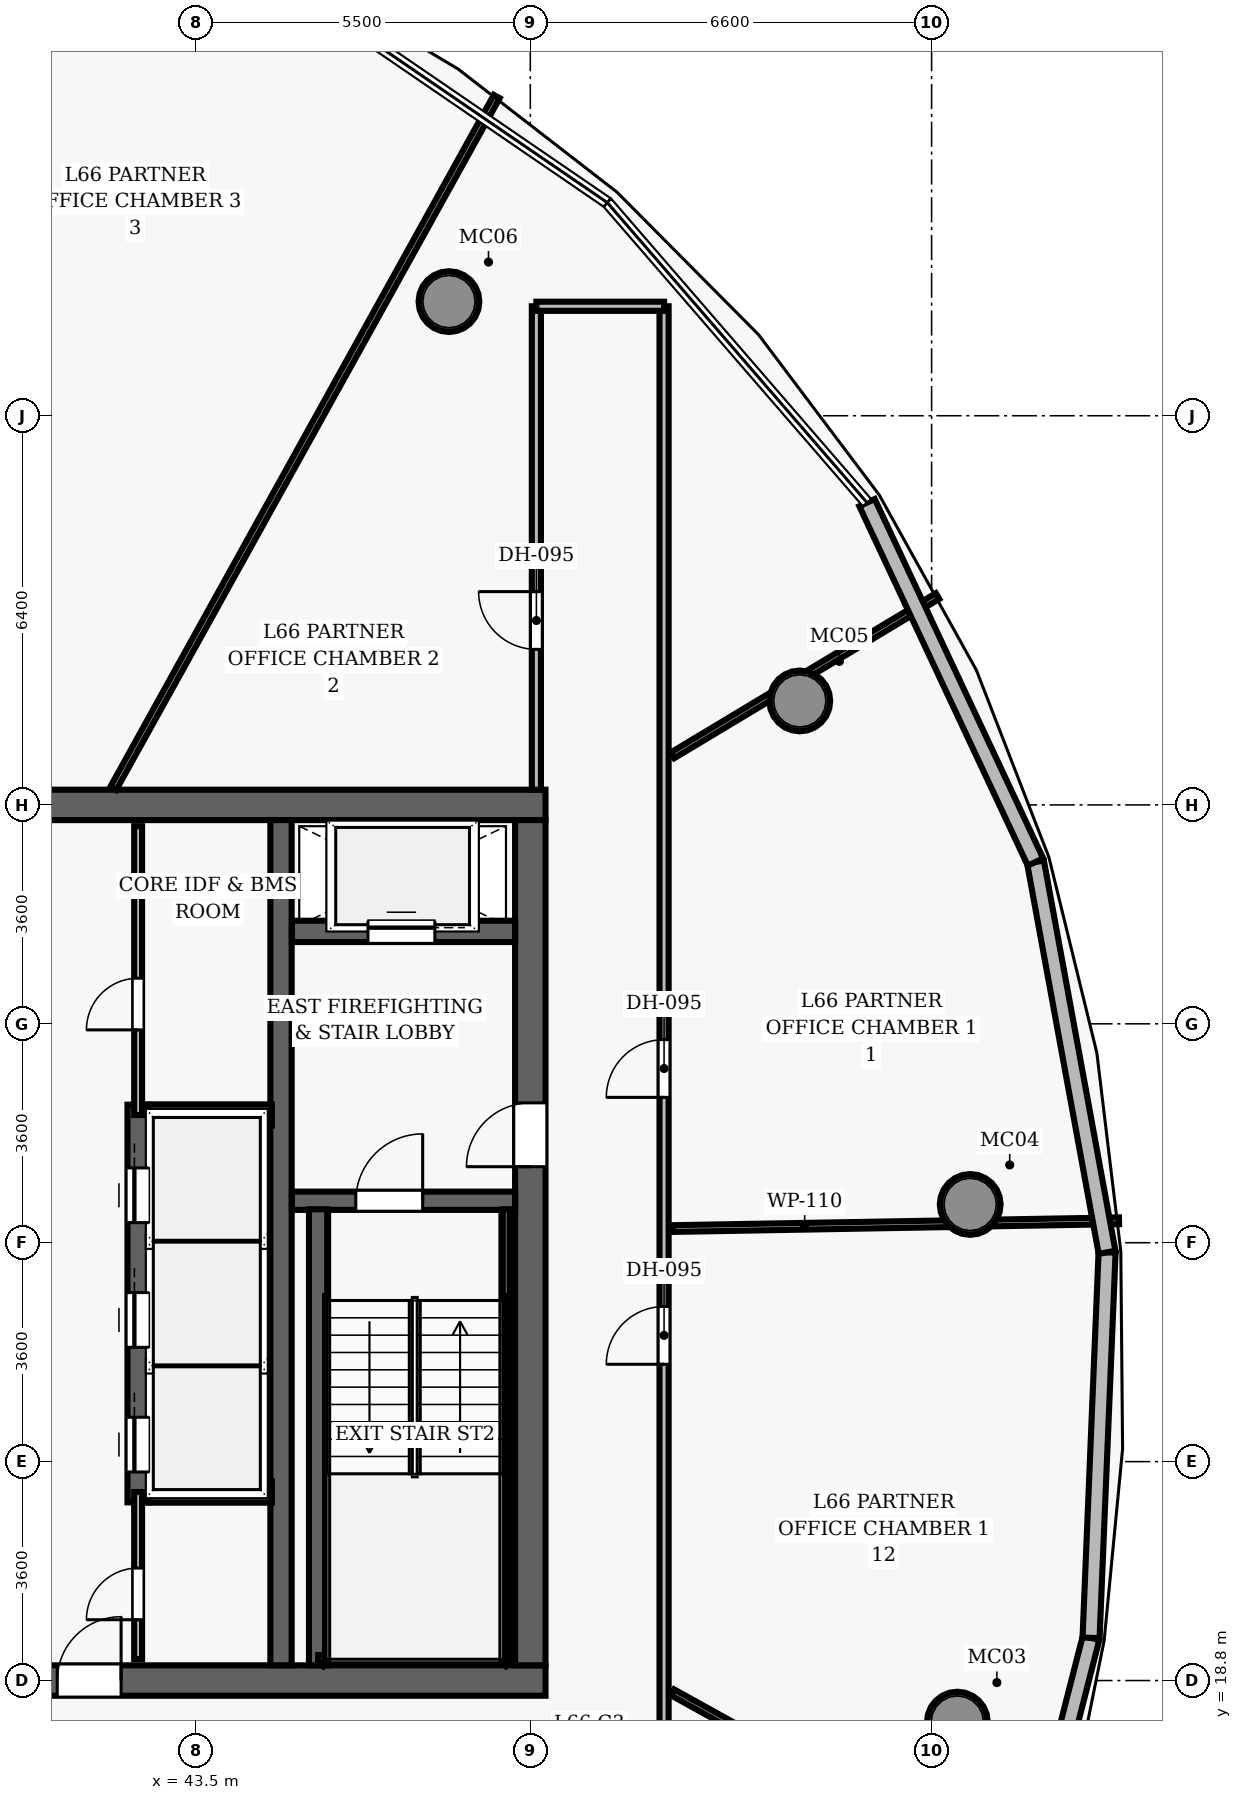
"""IFC4 building model, lengths in metres.
Left out: names, types, materials, properties, quantities, classifications, styles, units other than length and angle.
Written with IfcOpenShell. Run it as: python <this file> out.ifc"""

import sys

from ifc_helpers import new_model, si_unit, direction, frame, frame_2d, origin, origin_2d, place, context, subcontext, project, spatial, rectangle, hollow_circle, extrude, element, fill, save


model = new_model("IFC4")
c1 = context("Model", 3, precision=1e-05, world=origin(), true_north=direction((0.0, 1.0)))
c2 = subcontext(c1, "Body", "Model", "MODEL_VIEW")
j1 = project(units=[si_unit("LENGTHUNIT", "METRE"), si_unit("PLANEANGLEUNIT", "RADIAN")], contexts=[c1])
p1 = place(None, origin())
s1 = spatial("IfcSite", under=j1, at=p1, CompositionType="ELEMENT")
p2 = place(p1, origin())
s2 = spatial("IfcBuilding", under=s1, at=p2, CompositionType="ELEMENT")
p3 = place(p2, frame((0.0, 0.0, 261.3)))
s3 = spatial("IfcBuildingStorey", under=s2, at=p3, CompositionType="ELEMENT", Elevation=261.3)
p4 = place(p3, frame((26.75, 18.8, 0.0), z_axis=(0.0, 0.0, 1.0), x_axis=(1.0, 0.0, 0.0)))
e1 = element("IfcWall", 1, at=p4, inside=s3, PredefinedType="SHEAR", context=c2, shape_type="SweptSolid", body=[
    extrude(rectangle(XDim=22.5, YDim=0.5, at=frame_2d((11.25, 0.0))), origin(), (0.0, 0.0, 1.0), 3.85),
])
p5 = place(p4, frame((14.47, 0.0, 0.0)))
e2 = element("IfcOpeningElement", 2, at=p5, cuts=e1, PredefinedType="OPENING", context=c2, shape_type="SweptSolid", body=[
    extrude(rectangle(XDim=1.05, YDim=2.15, at=frame_2d((0.525, 1.075))), frame((0.0, 0.26, 0.0), z_axis=(0.0, -1.0, 0.0), x_axis=(1.0, 0.0, 0.0)), (0.0, 0.0, 1.0), 0.52),
])
p6 = place(p3, frame((26.75, 33.2, 0.0), z_axis=(0.0, 0.0, 1.0), x_axis=(1.0, 0.0, 0.0)))
e3 = element("IfcWall", 3, at=p6, inside=s3, PredefinedType="SHEAR", context=c2, shape_type="SweptSolid", body=[
    extrude(rectangle(XDim=22.5, YDim=0.5, at=frame_2d((11.25, 0.0))), origin(), (0.0, 0.0, 1.0), 3.85),
])
p7 = place(p3, frame((49.0, 19.05, 0.0), z_axis=(0.0, 0.0, 1.0), x_axis=(0.0, 1.0, 0.0)))
e4 = element("IfcWall", 4, at=p7, inside=s3, PredefinedType="SHEAR", context=c2, shape_type="SweptSolid", body=[
    extrude(rectangle(XDim=13.9, YDim=0.5, at=frame_2d((6.95, 0.0))), origin(), (0.0, 0.0, 1.0), 3.85),
])
p8 = place(p7, frame((8.2, 0.0, 0.0)))
e5 = element("IfcOpeningElement", 5, at=p8, cuts=e4, PredefinedType="OPENING", context=c2, shape_type="SweptSolid", body=[
    extrude(rectangle(XDim=1.05, YDim=2.15, at=frame_2d((0.525, 1.075))), frame((0.0, 0.26, 0.0), z_axis=(0.0, -1.0, 0.0), x_axis=(1.0, 0.0, 0.0)), (0.0, 0.0, 1.0), 0.52),
])
p9 = place(p3, frame((44.9, 19.05, 0.0), z_axis=(0.0, 0.0, 1.0), x_axis=(0.0, 1.0, 0.0)))
e6 = element("IfcWall", 6, at=p9, inside=s3, PredefinedType="SHEAR", context=c2, shape_type="SweptSolid", body=[
    extrude(rectangle(XDim=13.9, YDim=0.35, at=frame_2d((6.95, 0.0))), origin(), (0.0, 0.0, 1.0), 3.85),
])
for number, where, z_axis, x_axis in (
    (7, (56.024, 18.116, 0.0), (0.0, 0.0, 1.0), (1.0, 0.0, 0.0)),
    (8, (56.235, 26.629, 0.0), (0.0, 0.0, 1.0), (1.0, 0.0, 0.0)),
    (9, (53.433, 34.91, 0.0), (0.0, 0.0, 1.0), (1.0, 0.0, 0.0)),
    (10, (47.662, 41.477, 0.0), (0.0, 0.0, 1.0), (1.0, 0.0, 0.0)),
):
    element("IfcColumn", number, at=place(p3, frame(where, z_axis=z_axis, x_axis=x_axis)), inside=s3, PredefinedType="COLUMN", context=c2, shape_type="SweptSolid", body=[
        extrude(hollow_circle(Radius=0.5, WallThickness=0.045, at=origin_2d()), origin(), (0.0, 0.0, 1.0), 3.85),
    ])
p10 = place(p3, frame((45.08, 26.69, 0.0), z_axis=(0.0, 0.0, 1.0), x_axis=(1.0, 0.0, 0.0)))
e11 = element("IfcWall", 11, at=p10, inside=s3, PredefinedType="SHEAR", context=c2, shape_type="SweptSolid", body=[
    extrude(rectangle(XDim=3.67, YDim=0.3, at=frame_2d((1.835, 0.0))), origin(), (0.0, 0.0, 1.0), 3.85),
])
p11 = place(p10, frame((1.05, 0.0, 0.0)))
e12 = element("IfcOpeningElement", 12, at=p11, cuts=e11, PredefinedType="OPENING", context=c2, shape_type="SweptSolid", body=[
    extrude(rectangle(XDim=1.1, YDim=2.15, at=frame_2d((0.55, 1.075))), frame((0.0, 0.16, 0.0), z_axis=(0.0, -1.0, 0.0), x_axis=(1.0, 0.0, 0.0)), (0.0, 0.0, 1.0), 0.32),
])
p12 = place(p3, frame((45.51, 19.05, 0.0), z_axis=(0.0, 0.0, 1.0), x_axis=(0.0, 1.0, 0.0)))
e13 = element("IfcWall", 13, at=p12, inside=s3, PredefinedType="SHEAR", context=c2, shape_type="SweptSolid", body=[
    extrude(rectangle(XDim=7.5, YDim=0.3, at=frame_2d((3.75, 0.0))), origin(), (0.0, 0.0, 1.0), 3.85),
])
p13 = place(p3, frame((48.605, 19.1, 0.0), z_axis=(0.0, 0.0, 1.0), x_axis=(0.0, 1.0, 0.0)))
e14 = element("IfcWall", 14, at=p13, inside=s3, PredefinedType="SHEAR", context=c2, shape_type="SweptSolid", body=[
    extrude(rectangle(XDim=7.45, YDim=0.12, at=frame_2d((3.725, 0.0))), origin(), (0.0, 0.0, 1.0), 3.85),
])
p14 = place(p3, frame((45.51, 19.16, 0.0), z_axis=(0.0, 0.0, 1.0), x_axis=(1.0, 0.0, 0.0)))
e15 = element("IfcWall", 15, at=p14, inside=s3, PredefinedType="SHEAR", context=c2, shape_type="SweptSolid", body=[
    extrude(rectangle(XDim=3.095, YDim=0.12, at=frame_2d((1.547, 0.0))), origin(), (0.0, 0.0, 1.0), 3.85),
])
p15 = place(p3, frame((45.08, 31.12, 0.0), z_axis=(0.0, 0.0, 1.0), x_axis=(1.0, 0.0, 0.0)))
e16 = element("IfcWall", 16, at=p15, inside=s3, PredefinedType="SHEAR", context=c2, shape_type="SweptSolid", body=[
    extrude(rectangle(XDim=3.67, YDim=0.35, at=frame_2d((1.835, 0.0))), origin(), (0.0, 0.0, 1.0), 3.04),
])
p16 = place(p15, frame((1.25, 0.0, 0.0)))
e17 = element("IfcOpeningElement", 17, at=p16, cuts=e16, PredefinedType="OPENING", context=c2, shape_type="SweptSolid", body=[
    extrude(rectangle(XDim=1.1, YDim=2.15, at=frame_2d((0.55, 1.075))), frame((0.0, 0.185, 0.0), z_axis=(0.0, -1.0, 0.0), x_axis=(1.0, 0.0, 0.0)), (0.0, 0.0, 1.0), 0.37),
])
p17 = place(p3, frame((42.55, 21.73, 0.0), z_axis=(0.0, 0.0, 1.0), x_axis=(0.0, 1.0, 0.0)))
e18 = element("IfcWall", 18, at=p17, inside=s3, PredefinedType="SHEAR", context=c2, shape_type="SweptSolid", body=[
    extrude(rectangle(XDim=6.54, YDim=0.35, at=frame_2d((3.27, 0.0))), origin(), (0.0, 0.0, 1.0), 3.04),
])
p18 = place(p17, frame((0.5, 0.0, 0.0)))
e19 = element("IfcOpeningElement", 19, at=p18, cuts=e18, PredefinedType="OPENING", context=c2, shape_type="SweptSolid", body=[
    extrude(rectangle(XDim=0.9, YDim=2.15, at=frame_2d((0.45, 1.075))), frame((0.0, 0.185, 0.0), z_axis=(0.0, -1.0, 0.0), x_axis=(1.0, 0.0, 0.0)), (0.0, 0.0, 1.0), 0.37),
])
p19 = place(p17, frame((2.55, 0.0, 0.0)))
e20 = element("IfcOpeningElement", 20, at=p19, cuts=e18, PredefinedType="OPENING", context=c2, shape_type="SweptSolid", body=[
    extrude(rectangle(XDim=0.9, YDim=2.15, at=frame_2d((0.45, 1.075))), frame((0.0, 0.185, 0.0), z_axis=(0.0, -1.0, 0.0), x_axis=(1.0, 0.0, 0.0)), (0.0, 0.0, 1.0), 0.37),
])
p20 = place(p17, frame((4.6, 0.0, 0.0)))
e21 = element("IfcOpeningElement", 21, at=p20, cuts=e18, PredefinedType="OPENING", context=c2, shape_type="SweptSolid", body=[
    extrude(rectangle(XDim=0.9, YDim=2.15, at=frame_2d((0.45, 1.075))), frame((0.0, 0.185, 0.0), z_axis=(0.0, -1.0, 0.0), x_axis=(1.0, 0.0, 0.0)), (0.0, 0.0, 1.0), 0.37),
])
for number, where, z_axis, x_axis in (
    (22, (42.72, 21.9, 0.0), (0.0, 0.0, 1.0), (1.0, 0.0, 0.0)),
    (23, (42.72, 28.1, 0.0), (0.0, 0.0, 1.0), (1.0, 0.0, 0.0)),
):
    element("IfcWall", number, at=place(p3, frame(where, z_axis=z_axis, x_axis=x_axis)), inside=s3, PredefinedType="SHEAR", context=c2, shape_type="SweptSolid", body=[
        extrude(rectangle(XDim=2.03, YDim=0.35, at=frame_2d((1.015, 0.0))), origin(), (0.0, 0.0, 1.0), 3.04),
    ])
p21 = place(p3, frame((42.55, 28.1, 0.0), z_axis=(0.0, 0.0, 1.0), x_axis=(0.0, 1.0, 0.0)))
e24 = element("IfcWall", 24, at=p21, inside=s3, PredefinedType="PARTITIONING", context=c2, shape_type="SweptSolid", body=[
    extrude(rectangle(XDim=4.75, YDim=0.13, at=frame_2d((2.375, 0.0))), origin(), (0.0, 0.0, 1.0), 3.04),
])
p22 = place(p21, frame((1.4, 0.0, 0.0)))
e25 = element("IfcOpeningElement", 25, at=p22, cuts=e24, PredefinedType="OPENING", context=c2, shape_type="SweptSolid", body=[
    extrude(rectangle(XDim=0.85, YDim=2.1, at=frame_2d((0.425, 1.05))), frame((0.0, 0.075, 0.0), z_axis=(0.0, -1.0, 0.0), x_axis=(1.0, 0.0, 0.0)), (0.0, 0.0, 1.0), 0.15),
])
p23 = place(p3, frame((42.55, 19.15, 0.0), z_axis=(0.0, 0.0, 1.0), x_axis=(0.0, 1.0, 0.0)))
e26 = element("IfcWall", 26, at=p23, inside=s3, PredefinedType="PARTITIONING", context=c2, shape_type="SweptSolid", body=[
    extrude(rectangle(XDim=2.75, YDim=0.13, at=frame_2d((1.375, 0.0))), origin(), (0.0, 0.0, 1.0), 3.04),
])
p24 = place(p23, frame((0.65, 0.0, 0.0)))
e27 = element("IfcOpeningElement", 27, at=p24, cuts=e26, PredefinedType="OPENING", context=c2, shape_type="SweptSolid", body=[
    extrude(rectangle(XDim=0.85, YDim=2.1, at=frame_2d((0.425, 1.05))), frame((0.0, 0.075, 0.0), z_axis=(0.0, -1.0, 0.0), x_axis=(1.0, 0.0, 0.0)), (0.0, 0.0, 1.0), 0.15),
])
p25 = place(p3, frame((51.2, 10.6, 0.0), z_axis=(0.0, 0.0, 1.0), x_axis=(0.0, 1.0, 0.0)))
e28 = element("IfcWall", 28, at=p25, inside=s3, PredefinedType="PARTITIONING", context=c2, shape_type="SweptSolid", body=[
    extrude(rectangle(XDim=30.8, YDim=0.15, at=frame_2d((15.4, 0.0))), origin(), (0.0, 0.0, 1.0), 3.04),
])
p26 = place(p25, frame((17.79, 0.0, 0.0)))
e29 = element("IfcOpeningElement", 29, at=p26, cuts=e28, PredefinedType="OPENING", context=c2, shape_type="SweptSolid", body=[
    extrude(rectangle(XDim=0.95, YDim=2.15, at=frame_2d((0.475, 1.075))), frame((0.0, 0.085, 0.0), z_axis=(0.0, -1.0, 0.0), x_axis=(1.0, 0.0, 0.0)), (0.0, 0.0, 1.0), 0.17),
])
p27 = place(p25, frame((13.401, 0.0, 0.0)))
e30 = element("IfcOpeningElement", 30, at=p27, cuts=e28, PredefinedType="OPENING", context=c2, shape_type="SweptSolid", body=[
    extrude(rectangle(XDim=0.95, YDim=2.15, at=frame_2d((0.475, 1.075))), frame((0.0, 0.085, 0.0), z_axis=(0.0, -1.0, 0.0), x_axis=(1.0, 0.0, 0.0)), (0.0, 0.0, 1.0), 0.17),
])
p28 = place(p3, frame((49.1, 33.45, 0.0), z_axis=(0.0, 0.0, 1.0), x_axis=(0.0, 1.0, 0.0)))
e31 = element("IfcWall", 31, at=p28, inside=s3, PredefinedType="PARTITIONING", context=c2, shape_type="SweptSolid", body=[
    extrude(rectangle(XDim=7.95, YDim=0.15, at=frame_2d((3.975, 0.0))), origin(), (0.0, 0.0, 1.0), 3.04),
])
p29 = place(p28, frame((2.308, 0.0, 0.0)))
e32 = element("IfcOpeningElement", 32, at=p29, cuts=e31, PredefinedType="OPENING", context=c2, shape_type="SweptSolid", body=[
    extrude(rectangle(XDim=0.95, YDim=2.15, at=frame_2d((0.475, 1.075))), frame((0.0, 0.085, 0.0), z_axis=(0.0, -1.0, 0.0), x_axis=(1.0, 0.0, 0.0)), (0.0, 0.0, 1.0), 0.17),
])
p30 = place(p3, frame((49.1, 41.4, 0.0), z_axis=(0.0, 0.0, 1.0), x_axis=(1.0, 0.0, 0.0)))
e33 = element("IfcWall", 33, at=p30, inside=s3, PredefinedType="PARTITIONING", context=c2, shape_type="SweptSolid", body=[
    extrude(rectangle(XDim=2.1, YDim=0.15, at=frame_2d((1.05, 0.0))), origin(), (0.0, 0.0, 1.0), 3.04),
])
p31 = place(p3, frame((51.34, 26.233, 0.0), z_axis=(0.0, 0.0, 1.0), x_axis=(0.999847652319, 0.017454860422, 0.0)))
e34 = element("IfcWall", 34, at=p31, inside=s3, PredefinedType="PARTITIONING", context=c2, shape_type="SweptSolid", body=[
    extrude(rectangle(XDim=7.343, YDim=0.11, at=frame_2d((3.672, 0.0))), origin(), (0.0, 0.0, 1.0), 3.04),
])
p32 = place(p3, frame((51.34, 34.015, 0.0), z_axis=(0.0, 0.0, 1.0), x_axis=(0.857153776183, 0.51506058282, 0.0)))
e35 = element("IfcWall", 35, at=p32, inside=s3, PredefinedType="PARTITIONING", context=c2, shape_type="SweptSolid", body=[
    extrude(rectangle(XDim=5.084, YDim=0.11, at=frame_2d((2.542, 0.0))), origin(), (0.0, 0.0, 1.0), 3.04),
])
p33 = place(p3, frame((42.141, 33.47, 0.0), z_axis=(0.0, 0.0, 1.0), x_axis=(0.484812626369, 0.874618040812, 0.0)))
e36 = element("IfcWall", 36, at=p33, inside=s3, PredefinedType="PARTITIONING", context=c2, shape_type="SweptSolid", body=[
    extrude(rectangle(XDim=13.01, YDim=0.11, at=frame_2d((6.505, 0.0))), origin(), (0.0, 0.0, 1.0), 3.04),
])
p34 = place(p3, frame((51.34, 18.605, 0.0), z_axis=(0.0, 0.0, 1.0), x_axis=(0.874618985344, -0.484810922398, 0.0)))
e37 = element("IfcWall", 37, at=p34, inside=s3, PredefinedType="PARTITIONING", context=c2, shape_type="SweptSolid", body=[
    extrude(rectangle(XDim=7.003, YDim=0.11, at=frame_2d((3.501, 0.0))), origin(), (0.0, 0.0, 1.0), 3.04),
])
p35 = place(p3, frame((58.222, 19.502, 0.0), z_axis=(0.0, 0.0, 1.0), x_axis=(-0.247972381677, -0.968767102004, 0.0)))
e38 = element("IfcWall", 38, at=p35, inside=s3, PredefinedType="SOLIDWALL", context=c2, shape_type="SweptSolid", body=[
    extrude(rectangle(XDim=5.86, YDim=0.28, at=frame_2d((2.93, 0.0))), origin(), (0.0, 0.0, 1.0), 3.625),
])
p36 = place(p3, frame((58.486, 25.842, 0.0), z_axis=(0.0, 0.0, 1.0), x_axis=(-0.041516913296, -0.999137801262, 0.0)))
e39 = element("IfcWall", 39, at=p36, inside=s3, PredefinedType="SOLIDWALL", context=c2, shape_type="SweptSolid", body=[
    extrude(rectangle(XDim=6.345, YDim=0.28, at=frame_2d((3.172, 0.0))), origin(), (0.0, 0.0, 1.0), 3.625),
])
p37 = place(p3, frame((57.309, 32.261, 0.0), z_axis=(0.0, 0.0, 1.0), x_axis=(0.180386379847, -0.983595828562, 0.0)))
e40 = element("IfcWall", 40, at=p37, inside=s3, PredefinedType="SOLIDWALL", context=c2, shape_type="SweptSolid", body=[
    extrude(rectangle(XDim=6.526, YDim=0.28, at=frame_2d((3.263, 0.0))), origin(), (0.0, 0.0, 1.0), 3.625),
])
p38 = place(p3, frame((54.538, 38.171, 0.0), z_axis=(0.0, 0.0, 1.0), x_axis=(0.424508624762, -0.905423893822, 0.0)))
e41 = element("IfcWall", 41, at=p38, inside=s3, PredefinedType="SOLIDWALL", context=c2, shape_type="SweptSolid", body=[
    extrude(rectangle(XDim=6.527, YDim=0.28, at=frame_2d((3.263, 0.0))), origin(), (0.0, 0.0, 1.0), 3.625),
])
p39 = place(p11, origin())
e42 = element("IfcDoor", 42, at=p39, inside=s3, OperationType="SINGLE_SWING_RIGHT", PredefinedType="DOOR", context=c2, shape_type="SweptSolid", body=[
    extrude(rectangle(XDim=1.1, YDim=2.15, at=frame_2d((0.55, 1.075))), frame((0.0, 0.025, 0.0), z_axis=(0.0, -1.0, 0.0), x_axis=(1.0, 0.0, 0.0)), (0.0, 0.0, 1.0), 0.05),
])
fill(e12, e42)
p40 = place(p8, origin())
e43 = element("IfcDoor", 43, at=p40, inside=s3, OperationType="SINGLE_SWING_LEFT", PredefinedType="DOOR", context=c2, shape_type="SweptSolid", body=[
    extrude(rectangle(XDim=1.05, YDim=2.15, at=frame_2d((0.525, 1.075))), frame((0.0, 0.025, 0.0), z_axis=(0.0, -1.0, 0.0), x_axis=(1.0, 0.0, 0.0)), (0.0, 0.0, 1.0), 0.05),
])
fill(e5, e43)
p41 = place(p5, origin())
e44 = element("IfcDoor", 44, at=p41, inside=s3, OperationType="SINGLE_SWING_RIGHT", PredefinedType="DOOR", context=c2, shape_type="SweptSolid", body=[
    extrude(rectangle(XDim=1.05, YDim=2.15, at=frame_2d((0.525, 1.075))), frame((0.0, 0.025, 0.0), z_axis=(0.0, -1.0, 0.0), x_axis=(1.0, 0.0, 0.0)), (0.0, 0.0, 1.0), 0.05),
])
fill(e2, e44)
p42 = place(p22, origin())
e45 = element("IfcDoor", 45, at=p42, inside=s3, OperationType="SINGLE_SWING_LEFT", PredefinedType="DOOR", context=c2, shape_type="SweptSolid", body=[
    extrude(rectangle(XDim=0.85, YDim=2.1, at=frame_2d((0.425, 1.05))), frame((0.0, 0.025, 0.0), z_axis=(0.0, -1.0, 0.0), x_axis=(1.0, 0.0, 0.0)), (0.0, 0.0, 1.0), 0.05),
])
fill(e25, e45)
p43 = place(p24, origin())
e46 = element("IfcDoor", 46, at=p43, inside=s3, OperationType="SINGLE_SWING_LEFT", PredefinedType="DOOR", context=c2, shape_type="SweptSolid", body=[
    extrude(rectangle(XDim=0.85, YDim=2.1, at=frame_2d((0.425, 1.05))), frame((0.0, 0.025, 0.0), z_axis=(0.0, -1.0, 0.0), x_axis=(1.0, 0.0, 0.0)), (0.0, 0.0, 1.0), 0.05),
])
fill(e27, e46)
p44 = place(p26, origin())
e47 = element("IfcDoor", 47, at=p44, inside=s3, OperationType="SINGLE_SWING_LEFT", PredefinedType="DOOR", context=c2, shape_type="SweptSolid", body=[
    extrude(rectangle(XDim=0.95, YDim=2.15, at=frame_2d((0.475, 1.075))), frame((0.0, 0.025, 0.0), z_axis=(0.0, -1.0, 0.0), x_axis=(1.0, 0.0, 0.0)), (0.0, 0.0, 1.0), 0.05),
])
fill(e29, e47)
p45 = place(p29, origin())
e48 = element("IfcDoor", 48, at=p45, inside=s3, OperationType="SINGLE_SWING_RIGHT", PredefinedType="DOOR", context=c2, shape_type="SweptSolid", body=[
    extrude(rectangle(XDim=0.95, YDim=2.15, at=frame_2d((0.475, 1.075))), frame((0.0, 0.025, 0.0), z_axis=(0.0, -1.0, 0.0), x_axis=(1.0, 0.0, 0.0)), (0.0, 0.0, 1.0), 0.05),
])
fill(e32, e48)
p46 = place(p27, origin())
e49 = element("IfcDoor", 49, at=p46, inside=s3, OperationType="SINGLE_SWING_LEFT", PredefinedType="DOOR", context=c2, shape_type="SweptSolid", body=[
    extrude(rectangle(XDim=0.95, YDim=2.15, at=frame_2d((0.475, 1.075))), frame((0.0, 0.025, 0.0), z_axis=(0.0, -1.0, 0.0), x_axis=(1.0, 0.0, 0.0)), (0.0, 0.0, 1.0), 0.05),
])
fill(e30, e49)
p47 = place(p18, origin())
e50 = element("IfcDoor", 50, at=p47, inside=s3, OperationType="SLIDING_TO_LEFT", PredefinedType="DOOR", context=c2, shape_type="SweptSolid", body=[
    extrude(rectangle(XDim=0.9, YDim=2.15, at=frame_2d((0.45, 1.075))), frame((0.0, 0.025, 0.0), z_axis=(0.0, -1.0, 0.0), x_axis=(1.0, 0.0, 0.0)), (0.0, 0.0, 1.0), 0.05),
])
fill(e19, e50)
p48 = place(p19, origin())
e51 = element("IfcDoor", 51, at=p48, inside=s3, OperationType="SLIDING_TO_LEFT", PredefinedType="DOOR", context=c2, shape_type="SweptSolid", body=[
    extrude(rectangle(XDim=0.9, YDim=2.15, at=frame_2d((0.45, 1.075))), frame((0.0, 0.025, 0.0), z_axis=(0.0, -1.0, 0.0), x_axis=(1.0, 0.0, 0.0)), (0.0, 0.0, 1.0), 0.05),
])
fill(e20, e51)
p49 = place(p20, origin())
e52 = element("IfcDoor", 52, at=p49, inside=s3, OperationType="SLIDING_TO_LEFT", PredefinedType="DOOR", context=c2, shape_type="SweptSolid", body=[
    extrude(rectangle(XDim=0.9, YDim=2.15, at=frame_2d((0.45, 1.075))), frame((0.0, 0.025, 0.0), z_axis=(0.0, -1.0, 0.0), x_axis=(1.0, 0.0, 0.0)), (0.0, 0.0, 1.0), 0.05),
])
fill(e21, e52)
p50 = place(p16, origin())
e53 = element("IfcDoor", 53, at=p50, inside=s3, OperationType="SLIDING_TO_LEFT", PredefinedType="DOOR", context=c2, shape_type="SweptSolid", body=[
    extrude(rectangle(XDim=1.1, YDim=2.15, at=frame_2d((0.55, 1.075))), frame((0.0, 0.025, 0.0), z_axis=(0.0, -1.0, 0.0), x_axis=(1.0, 0.0, 0.0)), (0.0, 0.0, 1.0), 0.05),
])
fill(e17, e53)
save(model, sys.argv[1])
